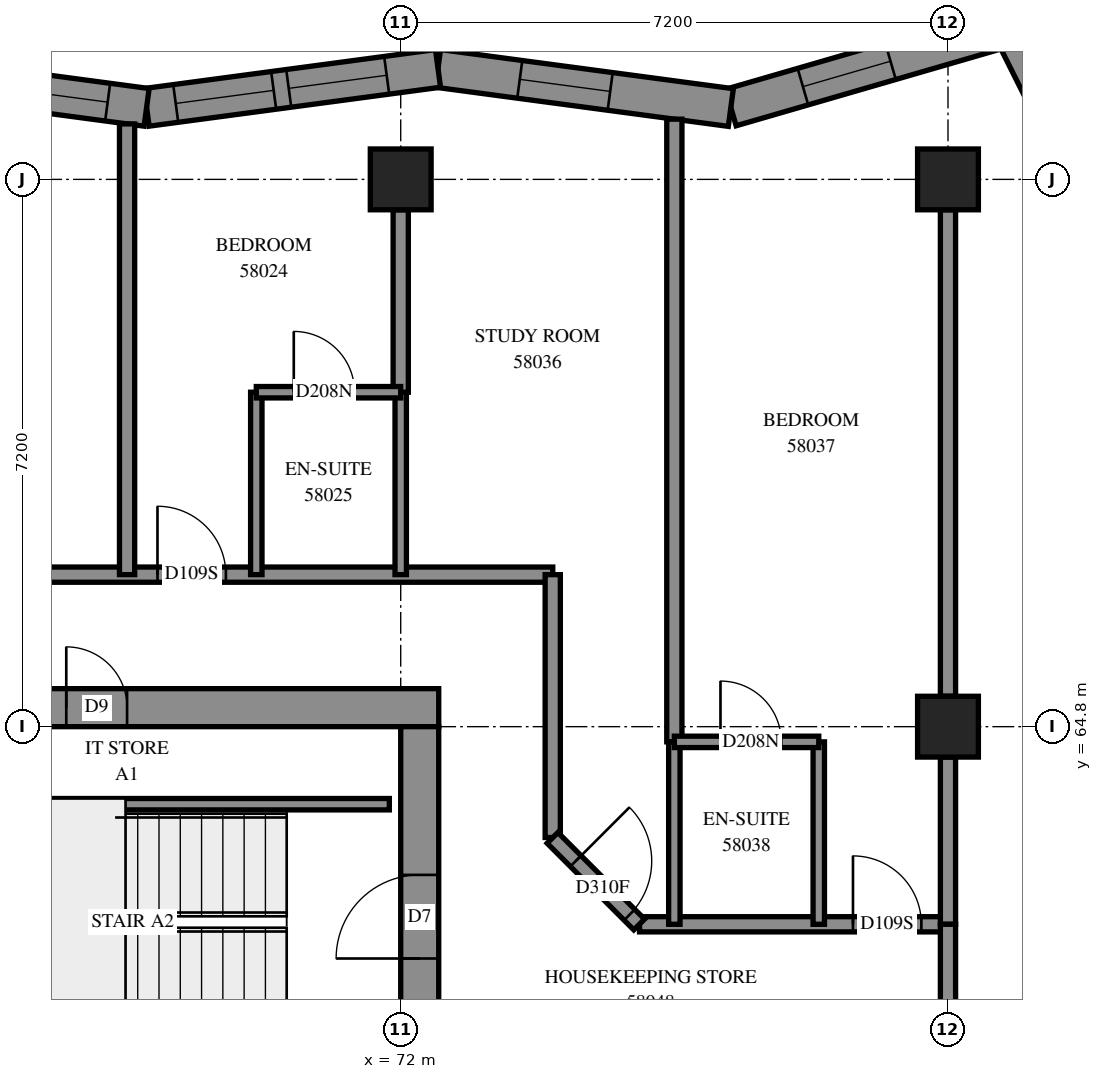
"""IFC4 building model, lengths in metres.
Left out: names, types, materials, properties, quantities, classifications, styles, units other than length and angle.
Written with IfcOpenShell. Run it as: python <this file> out.ifc"""

import sys

from ifc_helpers import new_model, si_unit, direction, frame, frame_2d, origin, origin_2d, place, context, subcontext, project, spatial, polyline, rectangle, outline, extrude, element, fill, save


model = new_model("IFC4")
c1 = context("Model", 3, precision=1e-05, world=origin(), true_north=direction((0.0, 1.0)))
c2 = subcontext(c1, "Body", "Model", "MODEL_VIEW")
j1 = project(units=[si_unit("LENGTHUNIT", "METRE"), si_unit("PLANEANGLEUNIT", "RADIAN")], contexts=[c1])
p1 = place(None, origin())
s1 = spatial("IfcSite", under=j1, at=p1, CompositionType="ELEMENT")
p2 = place(p1, origin())
s2 = spatial("IfcBuilding", under=s1, at=p2, CompositionType="ELEMENT")
p3 = place(p2, frame((0.0, 0.0, 213.4)))
s3 = spatial("IfcBuildingStorey", under=s2, at=p3, CompositionType="ELEMENT", Elevation=213.4)
for number, where, z_axis, x_axis in (
    (1, (72.0, 72.0, 0.0), (0.0, 0.0, 1.0), (1.0, 0.0, 0.0)),
    (2, (79.2, 64.8, 0.0), (0.0, 0.0, 1.0), (1.0, 0.0, 0.0)),
    (3, (79.2, 72.0, 0.0), (0.0, 0.0, 1.0), (1.0, 0.0, 0.0)),
):
    element("IfcColumn", number, at=place(p3, frame(where, z_axis=z_axis, x_axis=x_axis)), inside=s3, PredefinedType="COLUMN", context=c2, shape_type="SweptSolid", body=[
        extrude(rectangle(XDim=0.8, YDim=0.8, at=origin_2d()), origin(), (0.0, 0.0, 1.0), 3.1),
    ])
p4 = place(p3, frame((57.1, 65.05, -0.3), z_axis=(0.0, 0.0, 1.0), x_axis=(1.0, 0.0, 0.0)))
e4 = element("IfcWall", 4, at=p4, inside=s3, PredefinedType="SHEAR", context=c2, shape_type="SweptSolid", body=[
    extrude(rectangle(XDim=15.4, YDim=0.5, at=frame_2d((7.7, 0.0))), origin(), (0.0, 0.0, 1.0), 2.7),
])
p5 = place(p4, frame((10.5, 0.0, 0.3)))
e5 = element("IfcOpeningElement", 5, at=p5, cuts=e4, PredefinedType="OPENING", context=c2, shape_type="SweptSolid", body=[
    extrude(rectangle(XDim=0.8, YDim=2.1, at=frame_2d((0.4, 1.05))), frame((0.0, 0.26, 0.0), z_axis=(0.0, -1.0, 0.0), x_axis=(1.0, 0.0, 0.0)), (0.0, 0.0, 1.0), 0.52),
])
p6 = place(p3, frame((72.25, 50.4, -0.3), z_axis=(0.0, 0.0, 1.0), x_axis=(0.0, 1.0, 0.0)))
e6 = element("IfcWall", 6, at=p6, inside=s3, PredefinedType="SHEAR", context=c2, shape_type="SweptSolid", body=[
    extrude(rectangle(XDim=14.4, YDim=0.5, at=frame_2d((7.2, 0.0))), origin(), (0.0, 0.0, 1.0), 2.7),
])
p7 = place(p6, frame((4.55, 0.0, 0.3)))
e7 = element("IfcOpeningElement", 7, at=p7, cuts=e6, PredefinedType="OPENING", context=c2, shape_type="SweptSolid", body=[
    extrude(rectangle(XDim=1.1, YDim=2.1, at=frame_2d((0.55, 1.05))), frame((0.0, 0.26, 0.0), z_axis=(0.0, -1.0, 0.0), x_axis=(1.0, 0.0, 0.0)), (0.0, 0.0, 1.0), 0.52),
])
p8 = place(p6, frame((11.35, 0.0, 0.3)))
e8 = element("IfcOpeningElement", 8, at=p8, cuts=e6, PredefinedType="OPENING", context=c2, shape_type="SweptSolid", body=[
    extrude(rectangle(XDim=1.1, YDim=2.1, at=frame_2d((0.55, 1.05))), frame((0.0, 0.26, 0.0), z_axis=(0.0, -1.0, 0.0), x_axis=(1.0, 0.0, 0.0)), (0.0, 0.0, 1.0), 0.52),
])
p9 = place(p3, frame((81.534, 71.001, 0.0), z_axis=(0.0, 0.0, 1.0), x_axis=(-0.4471660935, 0.8944509404, 0.0)))
e9 = element("IfcWall", 9, at=p9, inside=s3, PredefinedType="SOLIDWALL", context=c2, shape_type="SweptSolid", body=[
    extrude(outline(polyline([(0.06, -0.25), (3.577, -0.25), (3.16, 0.25), (-0.06, 0.25), (0.06, -0.25)])), origin(), (0.0, 0.0, 1.0), 3.1),
])
p10 = place(p9, frame((0.742, 0.0, 0.45)))
e10 = element("IfcOpeningElement", 10, at=p10, cuts=e9, PredefinedType="OPENING", context=c2, shape_type="SweptSolid", body=[
    extrude(rectangle(XDim=1.2, YDim=2.5, at=frame_2d((0.6, 1.25))), frame((0.0, 0.26, 0.0), z_axis=(0.0, -1.0, 0.0), x_axis=(1.0, 0.0, 0.0)), (0.0, 0.0, 1.0), 0.52),
])
p11 = place(p3, frame((80.027, 74.014, 0.0), z_axis=(0.0, 0.0, 1.0), x_axis=(-0.9604074482, -0.2785992345, 0.0)))
e11 = element("IfcWall", 11, at=p11, inside=s3, PredefinedType="SOLIDWALL", context=c2, shape_type="SweptSolid", body=[
    extrude(outline(polyline([(-0.208, -0.25), (3.783, -0.25), (3.889, 0.25), (0.208, 0.25), (-0.208, -0.25)])), origin(), (0.0, 0.0, 1.0), 3.1),
])
p12 = place(p11, frame((1.649, 0.0, 0.45)))
e12 = element("IfcOpeningElement", 12, at=p12, cuts=e11, PredefinedType="OPENING", context=c2, shape_type="SweptSolid", body=[
    extrude(rectangle(XDim=1.2, YDim=2.5, at=frame_2d((0.6, 1.25))), frame((0.0, 0.26, 0.0), z_axis=(0.0, -1.0, 0.0), x_axis=(1.0, 0.0, 0.0)), (0.0, 0.0, 1.0), 0.52),
])
p13 = place(p3, frame((76.343, 72.945, 0.0), z_axis=(0.0, 0.0, 1.0), x_axis=(-0.991196865, 0.1323962796, 0.0)))
e13 = element("IfcWall", 13, at=p13, inside=s3, PredefinedType="SOLIDWALL", context=c2, shape_type="SweptSolid", body=[
    extrude(outline(polyline([(0.053, -0.25), (3.92, -0.25), (3.853, 0.25), (-0.053, 0.25), (0.053, -0.25)])), origin(), (0.0, 0.0, 1.0), 3.1),
])
p14 = place(p13, frame((1.602, 0.0, 0.45)))
e14 = element("IfcOpeningElement", 14, at=p14, cuts=e13, PredefinedType="OPENING", context=c2, shape_type="SweptSolid", body=[
    extrude(rectangle(XDim=1.2, YDim=2.5, at=frame_2d((0.6, 1.25))), frame((0.0, 0.26, 0.0), z_axis=(0.0, -1.0, 0.0), x_axis=(1.0, 0.0, 0.0)), (0.0, 0.0, 1.0), 0.52),
])
p15 = place(p3, frame((72.491, 73.46, 0.0), z_axis=(0.0, 0.0, 1.0), x_axis=(-0.9911985198, -0.13238389, 0.0)))
e15 = element("IfcWall", 15, at=p15, inside=s3, PredefinedType="SOLIDWALL", context=c2, shape_type="SweptSolid", body=[
    extrude(outline(polyline([(-0.033, -0.25), (3.834, -0.25), (3.901, 0.25), (0.033, 0.25), (-0.033, -0.25)])), origin(), (0.0, 0.0, 1.0), 3.1),
])
p16 = place(p15, frame((0.681, 0.0, 0.45)))
e16 = element("IfcOpeningElement", 16, at=p16, cuts=e15, PredefinedType="OPENING", context=c2, shape_type="SweptSolid", body=[
    extrude(rectangle(XDim=1.3, YDim=2.5, at=frame_2d((0.65, 1.25))), frame((0.0, 0.26, 0.0), z_axis=(0.0, -1.0, 0.0), x_axis=(1.0, 0.0, 0.0)), (0.0, 0.0, 1.0), 0.52),
])
p17 = place(p15, frame((2.181, 0.0, 0.45)))
e17 = element("IfcOpeningElement", 17, at=p17, cuts=e15, PredefinedType="OPENING", context=c2, shape_type="SweptSolid", body=[
    extrude(rectangle(XDim=1.3, YDim=2.5, at=frame_2d((0.65, 1.25))), frame((0.0, 0.26, 0.0), z_axis=(0.0, -1.0, 0.0), x_axis=(1.0, 0.0, 0.0)), (0.0, 0.0, 1.0), 0.52),
])
p18 = place(p3, frame((68.657, 72.948, 0.0), z_axis=(0.0, 0.0, 1.0), x_axis=(-0.9911989729, 0.1323804972, 0.0)))
e18 = element("IfcWall", 18, at=p18, inside=s3, PredefinedType="SOLIDWALL", context=c2, shape_type="SweptSolid", body=[
    extrude(outline(polyline([(0.033, -0.25), (3.901, -0.25), (3.834, 0.25), (-0.033, 0.25), (0.033, -0.25)])), origin(), (0.0, 0.0, 1.0), 3.1),
])
p19 = place(p18, frame((0.517, 0.0, 0.45)))
e19 = element("IfcOpeningElement", 19, at=p19, cuts=e18, PredefinedType="OPENING", context=c2, shape_type="SweptSolid", body=[
    extrude(rectangle(XDim=1.3, YDim=2.5, at=frame_2d((0.65, 1.25))), frame((0.0, 0.26, 0.0), z_axis=(0.0, -1.0, 0.0), x_axis=(1.0, 0.0, 0.0)), (0.0, 0.0, 1.0), 0.52),
])
p20 = place(p18, frame((2.017, 0.0, 0.45)))
e20 = element("IfcOpeningElement", 20, at=p20, cuts=e18, PredefinedType="OPENING", context=c2, shape_type="SweptSolid", body=[
    extrude(rectangle(XDim=1.3, YDim=2.5, at=frame_2d((0.65, 1.25))), frame((0.0, 0.26, 0.0), z_axis=(0.0, -1.0, 0.0), x_axis=(1.0, 0.0, 0.0)), (0.0, 0.0, 1.0), 0.52),
])
p21 = place(p3, frame((64.95, 63.78, 0.0), z_axis=(0.0, 0.0, 1.0), x_axis=(1.0, 0.0, 0.0)))
e21 = element("IfcWall", 21, at=p21, inside=s3, PredefinedType="PARTITIONING", context=c2, shape_type="SweptSolid", body=[
    extrude(rectangle(XDim=6.9, YDim=0.15, at=frame_2d((3.45, 0.0))), origin(), (0.0, 0.0, 1.0), 3.1),
])
p22 = place(p3, frame((55.6, 66.8, 0.0), z_axis=(0.0, 0.0, 1.0), x_axis=(1.0, 0.0, 0.0)))
e22 = element("IfcWall", 22, at=p22, inside=s3, PredefinedType="PARTITIONING", context=c2, shape_type="SweptSolid", body=[
    extrude(rectangle(XDim=18.4, YDim=0.2, at=frame_2d((9.2, 0.0))), origin(), (0.0, 0.0, 1.0), 3.1),
])
p23 = place(p22, frame((4.25, 0.0, 0.0)))
e23 = element("IfcOpeningElement", 23, at=p23, cuts=e22, PredefinedType="OPENING", context=c2, shape_type="SweptSolid", body=[
    extrude(rectangle(XDim=0.9, YDim=2.1, at=frame_2d((0.45, 1.05))), frame((0.0, 0.11, 0.0), z_axis=(0.0, -1.0, 0.0), x_axis=(1.0, 0.0, 0.0)), (0.0, 0.0, 1.0), 0.22),
])
p24 = place(p22, frame((7.974, 0.0, 0.0)))
e24 = element("IfcOpeningElement", 24, at=p24, cuts=e22, PredefinedType="OPENING", context=c2, shape_type="SweptSolid", body=[
    extrude(rectangle(XDim=1.0, YDim=2.1, at=frame_2d((0.5, 1.05))), frame((0.0, 0.11, 0.0), z_axis=(0.0, -1.0, 0.0), x_axis=(1.0, 0.0, 0.0)), (0.0, 0.0, 1.0), 0.22),
])
p25 = place(p22, frame((13.2, 0.0, 0.0)))
e25 = element("IfcOpeningElement", 25, at=p25, cuts=e22, PredefinedType="OPENING", context=c2, shape_type="SweptSolid", body=[
    extrude(rectangle(XDim=0.9, YDim=2.1, at=frame_2d((0.45, 1.05))), frame((0.0, 0.11, 0.0), z_axis=(0.0, -1.0, 0.0), x_axis=(1.0, 0.0, 0.0)), (0.0, 0.0, 1.0), 0.22),
])
p26 = place(p3, frame((75.6, 64.6, 0.0), z_axis=(0.0, 0.0, 1.0), x_axis=(0.0, 1.0, 0.0)))
e26 = element("IfcWall", 26, at=p26, inside=s3, PredefinedType="PARTITIONING", context=c2, shape_type="SweptSolid", body=[
    extrude(rectangle(XDim=8.192, YDim=0.2, at=frame_2d((4.096, 0.0))), origin(), (0.0, 0.0, 1.0), 3.1),
])
p27 = place(p3, frame((79.2, 65.2, 0.0), z_axis=(0.0, 0.0, 1.0), x_axis=(0.0, 1.0, 0.0)))
e27 = element("IfcWall", 27, at=p27, inside=s3, PredefinedType="PARTITIONING", context=c2, shape_type="SweptSolid", body=[
    extrude(rectangle(XDim=6.4, YDim=0.2, at=frame_2d((3.2, 0.0))), origin(), (0.0, 0.0, 1.0), 3.1),
])
p28 = place(p3, frame((68.4, 66.8, 0.0), z_axis=(0.0, 0.0, 1.0), x_axis=(0.0, 1.0, 0.0)))
e28 = element("IfcWall", 28, at=p28, inside=s3, PredefinedType="PARTITIONING", context=c2, shape_type="SweptSolid", body=[
    extrude(rectangle(XDim=5.93, YDim=0.2, at=frame_2d((2.965, 0.0))), origin(), (0.0, 0.0, 1.0), 3.1),
])
p29 = place(p3, frame((75.142, 62.2, 0.0), z_axis=(0.0, 0.0, 1.0), x_axis=(1.0, 0.0, 0.0)))
e29 = element("IfcWall", 29, at=p29, inside=s3, PredefinedType="PARTITIONING", context=c2, shape_type="SweptSolid", body=[
    extrude(rectangle(XDim=4.058, YDim=0.2, at=frame_2d((2.029, 0.0))), origin(), (0.0, 0.0, 1.0), 3.1),
])
p30 = place(p29, frame((2.808, 0.0, 0.0)))
e30 = element("IfcOpeningElement", 30, at=p30, cuts=e29, PredefinedType="OPENING", context=c2, shape_type="SweptSolid", body=[
    extrude(rectangle(XDim=0.9, YDim=2.1, at=frame_2d((0.45, 1.05))), frame((0.0, 0.11, 0.0), z_axis=(0.0, -1.0, 0.0), x_axis=(1.0, 0.0, 0.0)), (0.0, 0.0, 1.0), 0.22),
])
p31 = place(p3, frame((74.0, 63.342, 0.0), z_axis=(0.0, 0.0, 1.0), x_axis=(0.0, 1.0, 0.0)))
e31 = element("IfcWall", 31, at=p31, inside=s3, PredefinedType="PARTITIONING", context=c2, shape_type="SweptSolid", body=[
    extrude(rectangle(XDim=3.458, YDim=0.2, at=frame_2d((1.729, 0.0))), origin(), (0.0, 0.0, 1.0), 3.1),
])
for number, where, z_axis, x_axis in (
    (32, (70.1, 66.8, 0.0), (0.0, 0.0, 1.0), (0.0, 1.0, 0.0)),
    (33, (72.0, 66.8, 0.0), (0.0, 0.0, 1.0), (0.0, 1.0, 0.0)),
):
    element("IfcWall", number, at=place(p3, frame(where, z_axis=z_axis, x_axis=x_axis)), inside=s3, PredefinedType="PARTITIONING", context=c2, shape_type="SweptSolid", body=[
        extrude(rectangle(XDim=2.4, YDim=0.15, at=frame_2d((1.2, 0.0))), origin(), (0.0, 0.0, 1.0), 3.1),
    ])
p32 = place(p3, frame((72.0, 69.2, 0.0), z_axis=(0.0, 0.0, 1.0), x_axis=(0.0, 1.0, 0.0)))
e34 = element("IfcWall", 34, at=p32, inside=s3, PredefinedType="PARTITIONING", context=c2, shape_type="SweptSolid", body=[
    extrude(rectangle(XDim=2.4, YDim=0.2, at=frame_2d((1.2, 0.0))), origin(), (0.0, 0.0, 1.0), 3.1),
])
for number, where, z_axis, x_axis in (
    (35, (75.6, 62.2, 0.0), (0.0, 0.0, 1.0), (0.0, 1.0, 0.0)),
    (36, (77.5, 62.2, 0.0), (0.0, 0.0, 1.0), (0.0, 1.0, 0.0)),
):
    element("IfcWall", number, at=place(p3, frame(where, z_axis=z_axis, x_axis=x_axis)), inside=s3, PredefinedType="PARTITIONING", context=c2, shape_type="SweptSolid", body=[
        extrude(rectangle(XDim=2.4, YDim=0.15, at=frame_2d((1.2, 0.0))), origin(), (0.0, 0.0, 1.0), 3.1),
    ])
p33 = place(p3, frame((79.2, 62.2, 0.0), z_axis=(0.0, 0.0, 1.0), x_axis=(0.0, 1.0, 0.0)))
e37 = element("IfcWall", 37, at=p33, inside=s3, PredefinedType="PARTITIONING", context=c2, shape_type="SweptSolid", body=[
    extrude(rectangle(XDim=2.2, YDim=0.2, at=frame_2d((1.1, 0.0))), origin(), (0.0, 0.0, 1.0), 3.1),
])
p34 = place(p3, frame((79.2, 60.2, 0.0), z_axis=(0.0, 0.0, 1.0), x_axis=(0.0, 1.0, 0.0)))
e38 = element("IfcWall", 38, at=p34, inside=s3, PredefinedType="PARTITIONING", context=c2, shape_type="SweptSolid", body=[
    extrude(rectangle(XDim=2.0, YDim=0.2, at=frame_2d((1.0, 0.0))), origin(), (0.0, 0.0, 1.0), 3.1),
])
p35 = place(p3, frame((75.6, 64.6, 0.0), z_axis=(0.0, 0.0, 1.0), x_axis=(1.0, 0.0, 0.0)))
e39 = element("IfcWall", 39, at=p35, inside=s3, PredefinedType="PARTITIONING", context=c2, shape_type="SweptSolid", body=[
    extrude(rectangle(XDim=1.9, YDim=0.15, at=frame_2d((0.95, 0.0))), origin(), (0.0, 0.0, 1.0), 3.1),
])
p36 = place(p35, frame((0.607, 0.0, 0.0)))
e40 = element("IfcOpeningElement", 40, at=p36, cuts=e39, PredefinedType="OPENING", context=c2, shape_type="SweptSolid", body=[
    extrude(rectangle(XDim=0.8, YDim=2.1, at=frame_2d((0.4, 1.05))), frame((0.0, 0.085, 0.0), z_axis=(0.0, -1.0, 0.0), x_axis=(1.0, 0.0, 0.0)), (0.0, 0.0, 1.0), 0.17),
])
p37 = place(p3, frame((70.1, 69.2, 0.0), z_axis=(0.0, 0.0, 1.0), x_axis=(1.0, 0.0, 0.0)))
e41 = element("IfcWall", 41, at=p37, inside=s3, PredefinedType="PARTITIONING", context=c2, shape_type="SweptSolid", body=[
    extrude(rectangle(XDim=1.9, YDim=0.15, at=frame_2d((0.95, 0.0))), origin(), (0.0, 0.0, 1.0), 3.1),
])
p38 = place(p37, frame((0.493, 0.0, 0.0)))
e42 = element("IfcOpeningElement", 42, at=p38, cuts=e41, PredefinedType="OPENING", context=c2, shape_type="SweptSolid", body=[
    extrude(rectangle(XDim=0.8, YDim=2.1, at=frame_2d((0.4, 1.05))), frame((0.0, 0.085, 0.0), z_axis=(0.0, -1.0, 0.0), x_axis=(1.0, 0.0, 0.0)), (0.0, 0.0, 1.0), 0.17),
])
p39 = place(p3, frame((73.997, 63.337, 0.0), z_axis=(0.0, 0.0, 1.0), x_axis=(0.7071067812, -0.7071067812, 0.0)))
e43 = element("IfcWall", 43, at=p39, inside=s3, PredefinedType="PARTITIONING", context=c2, shape_type="SweptSolid", body=[
    extrude(rectangle(XDim=1.612, YDim=0.2, at=frame_2d((0.806, 0.0))), origin(), (0.0, 0.0, 1.0), 3.1),
])
p40 = place(p39, frame((0.432, 0.0, 0.0)))
e44 = element("IfcOpeningElement", 44, at=p40, cuts=e43, PredefinedType="OPENING", context=c2, shape_type="SweptSolid", body=[
    extrude(rectangle(XDim=1.0, YDim=2.1, at=frame_2d((0.5, 1.05))), frame((0.0, 0.11, 0.0), z_axis=(0.0, -1.0, 0.0), x_axis=(1.0, 0.0, 0.0)), (0.0, 0.0, 1.0), 0.22),
])
p41 = place(p12, origin())
e45 = element("IfcWindow", 45, at=p41, inside=s3, PartitioningType="SINGLE_PANEL", PredefinedType="WINDOW", context=c2, shape_type="SweptSolid", body=[
    extrude(rectangle(XDim=1.2, YDim=2.5, at=frame_2d((0.6, 1.25))), frame((0.0, 0.18, 0.0), z_axis=(0.0, -1.0, 0.0), x_axis=(1.0, 0.0, 0.0)), (0.0, 0.0, 1.0), 0.06),
])
fill(e12, e45)
p42 = place(p14, origin())
e46 = element("IfcWindow", 46, at=p42, inside=s3, PartitioningType="SINGLE_PANEL", PredefinedType="WINDOW", context=c2, shape_type="SweptSolid", body=[
    extrude(rectangle(XDim=1.2, YDim=2.5, at=frame_2d((0.6, 1.25))), frame((0.0, 0.18, 0.0), z_axis=(0.0, -1.0, 0.0), x_axis=(1.0, 0.0, 0.0)), (0.0, 0.0, 1.0), 0.06),
])
fill(e14, e46)
p43 = place(p16, origin())
e47 = element("IfcWindow", 47, at=p43, inside=s3, PartitioningType="SINGLE_PANEL", PredefinedType="WINDOW", context=c2, shape_type="SweptSolid", body=[
    extrude(rectangle(XDim=1.3, YDim=2.5, at=frame_2d((0.65, 1.25))), frame((0.0, 0.18, 0.0), z_axis=(0.0, -1.0, 0.0), x_axis=(1.0, 0.0, 0.0)), (0.0, 0.0, 1.0), 0.06),
])
fill(e16, e47)
p44 = place(p17, origin())
e48 = element("IfcWindow", 48, at=p44, inside=s3, PartitioningType="SINGLE_PANEL", PredefinedType="WINDOW", context=c2, shape_type="SweptSolid", body=[
    extrude(rectangle(XDim=1.3, YDim=2.5, at=frame_2d((0.65, 1.25))), frame((0.0, 0.18, 0.0), z_axis=(0.0, -1.0, 0.0), x_axis=(1.0, 0.0, 0.0)), (0.0, 0.0, 1.0), 0.06),
])
fill(e17, e48)
p45 = place(p19, origin())
e49 = element("IfcWindow", 49, at=p45, inside=s3, PartitioningType="SINGLE_PANEL", PredefinedType="WINDOW", context=c2, shape_type="SweptSolid", body=[
    extrude(rectangle(XDim=1.3, YDim=2.5, at=frame_2d((0.65, 1.25))), frame((0.0, 0.18, 0.0), z_axis=(0.0, -1.0, 0.0), x_axis=(1.0, 0.0, 0.0)), (0.0, 0.0, 1.0), 0.06),
])
fill(e19, e49)
p46 = place(p5, origin())
e50 = element("IfcDoor", 50, at=p46, inside=s3, OperationType="SINGLE_SWING_RIGHT", PredefinedType="DOOR", context=c2, shape_type="SweptSolid", body=[
    extrude(rectangle(XDim=0.8, YDim=2.1, at=frame_2d((0.4, 1.05))), frame((0.0, 0.025, 0.0), z_axis=(0.0, -1.0, 0.0), x_axis=(1.0, 0.0, 0.0)), (0.0, 0.0, 1.0), 0.05),
])
fill(e5, e50)
p47 = place(p8, origin())
e51 = element("IfcDoor", 51, at=p47, inside=s3, OperationType="SINGLE_SWING_RIGHT", PredefinedType="DOOR", context=c2, shape_type="SweptSolid", body=[
    extrude(rectangle(XDim=1.1, YDim=2.1, at=frame_2d((0.55, 1.05))), frame((0.0, 0.025, 0.0), z_axis=(0.0, -1.0, 0.0), x_axis=(1.0, 0.0, 0.0)), (0.0, 0.0, 1.0), 0.05),
])
fill(e8, e51)
p48 = place(p25, origin())
e52 = element("IfcDoor", 52, at=p48, inside=s3, OperationType="SINGLE_SWING_LEFT", PredefinedType="DOOR", context=c2, shape_type="SweptSolid", body=[
    extrude(rectangle(XDim=0.9, YDim=2.1, at=frame_2d((0.45, 1.05))), frame((0.0, 0.025, 0.0), z_axis=(0.0, -1.0, 0.0), x_axis=(1.0, 0.0, 0.0)), (0.0, 0.0, 1.0), 0.05),
])
fill(e25, e52)
p49 = place(p38, origin())
e53 = element("IfcDoor", 53, at=p49, inside=s3, OperationType="SINGLE_SWING_RIGHT", PredefinedType="DOOR", context=c2, shape_type="SweptSolid", body=[
    extrude(rectangle(XDim=0.8, YDim=2.1, at=frame_2d((0.4, 1.05))), frame((0.0, 0.025, 0.0), z_axis=(0.0, -1.0, 0.0), x_axis=(1.0, 0.0, 0.0)), (0.0, 0.0, 1.0), 0.05),
])
fill(e42, e53)
p50 = place(p40, origin())
e54 = element("IfcDoor", 54, at=p50, inside=s3, OperationType="SINGLE_SWING_RIGHT", PredefinedType="DOOR", context=c2, shape_type="SweptSolid", body=[
    extrude(rectangle(XDim=1.0, YDim=2.1, at=frame_2d((0.5, 1.05))), frame((0.0, 0.025, 0.0), z_axis=(0.0, -1.0, 0.0), x_axis=(1.0, 0.0, 0.0)), (0.0, 0.0, 1.0), 0.05),
])
fill(e44, e54)
p51 = place(p30, origin())
e55 = element("IfcDoor", 55, at=p51, inside=s3, OperationType="SINGLE_SWING_LEFT", PredefinedType="DOOR", context=c2, shape_type="SweptSolid", body=[
    extrude(rectangle(XDim=0.9, YDim=2.1, at=frame_2d((0.45, 1.05))), frame((0.0, 0.025, 0.0), z_axis=(0.0, -1.0, 0.0), x_axis=(1.0, 0.0, 0.0)), (0.0, 0.0, 1.0), 0.05),
])
fill(e30, e55)
p52 = place(p36, origin())
e56 = element("IfcDoor", 56, at=p52, inside=s3, OperationType="SINGLE_SWING_RIGHT", PredefinedType="DOOR", context=c2, shape_type="SweptSolid", body=[
    extrude(rectangle(XDim=0.8, YDim=2.1, at=frame_2d((0.4, 1.05))), frame((0.0, 0.025, 0.0), z_axis=(0.0, -1.0, 0.0), x_axis=(1.0, 0.0, 0.0)), (0.0, 0.0, 1.0), 0.05),
])
fill(e40, e56)
save(model, sys.argv[1])
